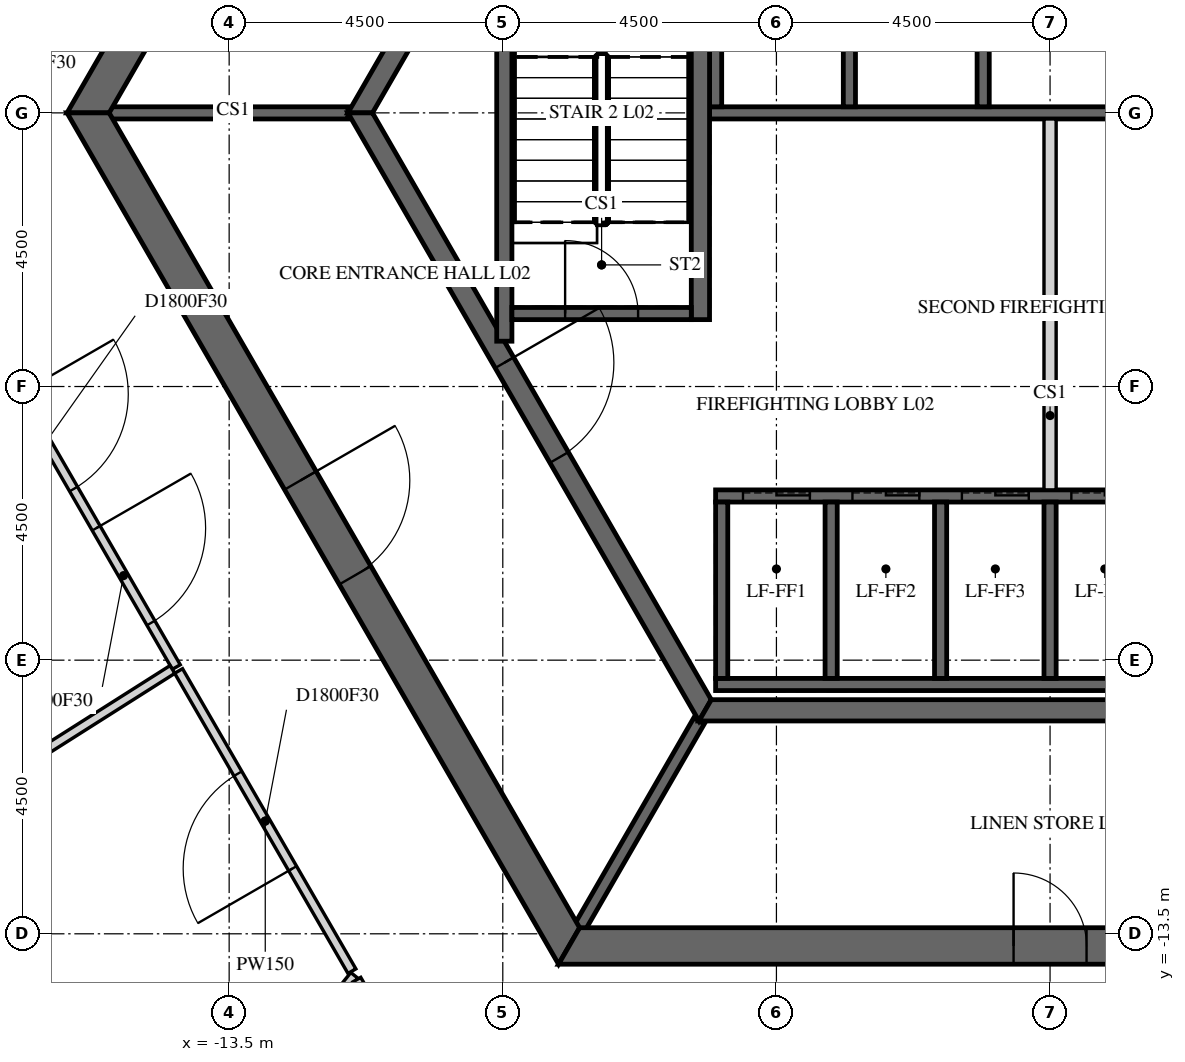
"""IFC4 building model, lengths in metres.
Left out: names, types, materials, properties, quantities, classifications, styles, units other than length and angle.
Written with IfcOpenShell. Run it as: python <this file> out.ifc"""

import sys

from ifc_helpers import new_model, si_unit, direction, frame, frame_2d, origin, place, context, subcontext, project, spatial, polyline, rectangle, outline, extrude, element, fill, save


model = new_model("IFC4")
c1 = context("Model", 3, precision=1e-05, world=origin(), true_north=direction((0.0, 1.0)))
c2 = subcontext(c1, "Body", "Model", "MODEL_VIEW")
j1 = project(units=[si_unit("LENGTHUNIT", "METRE"), si_unit("PLANEANGLEUNIT", "RADIAN")], contexts=[c1])
p1 = place(None, origin())
s1 = spatial("IfcSite", under=j1, at=p1, CompositionType="ELEMENT")
p2 = place(p1, origin())
s2 = spatial("IfcBuilding", under=s1, at=p2, CompositionType="ELEMENT")
p3 = place(p2, frame((0.0, 0.0, 15.0)))
s3 = spatial("IfcBuildingStorey", under=s2, at=p3, CompositionType="ELEMENT", Elevation=15.0)
p4 = place(p3, frame((-7.91, 13.7, -0.25), z_axis=(0.0, 0.0, 1.0), x_axis=(-0.499999880136, -0.866025472988, 0.0)))
e1 = element("IfcWall", 1, at=p4, inside=s3, PredefinedType="SHEAR", context=c2, shape_type="SweptSolid", body=[
    extrude(outline(polyline([(-0.173, -0.3), (15.993, -0.3), (15.646, 0.3), (0.173, 0.3), (-0.173, -0.3)])), origin(), (0.0, 0.0, 1.0), 5.5),
])
p5 = place(p4, frame((7.039, 0.0, 0.25)))
e2 = element("IfcOpeningElement", 2, at=p5, cuts=e1, PredefinedType="OPENING", context=c2, shape_type="SweptSolid", body=[
    extrude(rectangle(XDim=1.8, YDim=2.4, at=frame_2d((0.9, 1.2))), frame((0.0, 0.31, 0.0), z_axis=(0.0, -1.0, 0.0), x_axis=(1.0, 0.0, 0.0)), (0.0, 0.0, 1.0), 0.62),
])
p6 = place(p3, frame((-15.819, 0.0, -0.25), z_axis=(0.0, 0.0, 1.0), x_axis=(0.499999880136, -0.866025472988, 0.0)))
e3 = element("IfcWall", 3, at=p6, inside=s3, PredefinedType="SHEAR", context=c2, shape_type="SweptSolid", body=[
    extrude(outline(polyline([(-0.173, -0.3), (15.993, -0.3), (15.646, 0.3), (0.173, 0.3), (-0.173, -0.3)])), origin(), (0.0, 0.0, 1.0), 5.5),
])
p7 = place(p6, frame((6.981, 0.0, 0.25)))
e4 = element("IfcOpeningElement", 4, at=p7, cuts=e3, PredefinedType="OPENING", context=c2, shape_type="SweptSolid", body=[
    extrude(rectangle(XDim=1.8, YDim=2.4, at=frame_2d((0.9, 1.2))), frame((0.0, 0.31, 0.0), z_axis=(0.0, -1.0, 0.0), x_axis=(1.0, 0.0, 0.0)), (0.0, 0.0, 1.0), 0.62),
])
p8 = place(p3, frame((-7.91, -13.7, -0.25), z_axis=(0.0, 0.0, 1.0), x_axis=(1.0, 0.0, 0.0)))
e5 = element("IfcWall", 5, at=p8, inside=s3, PredefinedType="SHEAR", context=c2, shape_type="SweptSolid", body=[
    extrude(outline(polyline([(-0.173, -0.3), (15.993, -0.3), (15.646, 0.3), (0.173, 0.3), (-0.173, -0.3)])), origin(), (0.0, 0.0, 1.0), 5.5),
])
p9 = place(p8, frame((7.31, 0.0, 0.25)))
e6 = element("IfcOpeningElement", 6, at=p9, cuts=e5, PredefinedType="OPENING", context=c2, shape_type="SweptSolid", body=[
    extrude(rectangle(XDim=1.2, YDim=2.4, at=frame_2d((0.6, 1.2))), frame((0.0, 0.31, 0.0), z_axis=(0.0, -1.0, 0.0), x_axis=(1.0, 0.0, 0.0)), (0.0, 0.0, 1.0), 0.62),
])
p10 = place(p3, frame((-5.673, 9.825, -0.25), z_axis=(0.0, 0.0, 1.0), x_axis=(-0.499995046907, -0.866028263435, 0.0)))
e7 = element("IfcWall", 7, at=p10, inside=s3, PredefinedType="SHEAR", context=c2, shape_type="SweptSolid", body=[
    extrude(outline(polyline([(-0.101, -0.175), (11.446, -0.175), (11.244, 0.175), (0.101, 0.175), (-0.101, -0.175)])), origin(), (0.0, 0.0, 1.0), 5.5),
])
p11 = place(p10, frame((4.801, 0.0, 0.25)))
e8 = element("IfcOpeningElement", 8, at=p11, cuts=e7, PredefinedType="OPENING", context=c2, shape_type="SweptSolid", body=[
    extrude(rectangle(XDim=1.8, YDim=2.4, at=frame_2d((0.9, 1.2))), frame((0.0, 0.185, 0.0), z_axis=(0.0, -1.0, 0.0), x_axis=(1.0, 0.0, 0.0)), (0.0, 0.0, 1.0), 0.37),
])
p12 = place(p3, frame((-11.345, 0.0, -0.25), z_axis=(0.0, 0.0, 1.0), x_axis=(0.499995046907, -0.866028263435, 0.0)))
e9 = element("IfcWall", 9, at=p12, inside=s3, PredefinedType="SHEAR", context=c2, shape_type="SweptSolid", body=[
    extrude(outline(polyline([(-0.101, -0.175), (11.446, -0.175), (11.244, 0.175), (0.101, 0.175), (-0.101, -0.175)])), origin(), (0.0, 0.0, 1.0), 5.5),
])
p13 = place(p12, frame((4.744, 0.0, 0.25)))
e10 = element("IfcOpeningElement", 10, at=p13, cuts=e9, PredefinedType="OPENING", context=c2, shape_type="SweptSolid", body=[
    extrude(rectangle(XDim=1.8, YDim=2.4, at=frame_2d((0.9, 1.2))), frame((0.0, 0.185, 0.0), z_axis=(0.0, -1.0, 0.0), x_axis=(1.0, 0.0, 0.0)), (0.0, 0.0, 1.0), 0.37),
])
p14 = place(p3, frame((-5.673, -9.825, -0.25), z_axis=(0.0, 0.0, 1.0), x_axis=(1.0, 0.0, 0.0)))
e11 = element("IfcWall", 11, at=p14, inside=s3, PredefinedType="SHEAR", context=c2, shape_type="SweptSolid", body=[
    extrude(outline(polyline([(-0.101, -0.175), (11.446, -0.175), (11.244, 0.175), (0.101, 0.175), (-0.101, -0.175)])), origin(), (0.0, 0.0, 1.0), 5.5),
])
p15 = place(p3, frame((-5.6, 0.0, -0.25), z_axis=(0.0, 0.0, 1.0), x_axis=(1.0, 0.0, 0.0)))
e12 = element("IfcWall", 12, at=p15, inside=s3, PredefinedType="SHEAR", context=c2, shape_type="SweptSolid", body=[
    extrude(rectangle(XDim=11.2, YDim=0.2, at=frame_2d((5.6, 0.0))), origin(), (0.0, 0.0, 1.0), 5.5),
])
for number, where, z_axis, x_axis in (
    (13, (-5.5, 0.1, -0.25), (0.0, 0.0, 1.0), (0.0, 1.0, 0.0)),
    (14, (-3.3, 0.1, -0.25), (0.0, 0.0, 1.0), (0.0, 1.0, 0.0)),
    (15, (-1.1, 0.1, -0.25), (0.0, 0.0, 1.0), (0.0, 1.0, 0.0)),
):
    element("IfcWall", number, at=place(p3, frame(where, z_axis=z_axis, x_axis=x_axis)), inside=s3, PredefinedType="SHEAR", context=c2, shape_type="SweptSolid", body=[
        extrude(rectangle(XDim=3.1, YDim=0.2, at=frame_2d((1.55, 0.0))), origin(), (0.0, 0.0, 1.0), 5.5),
    ])
p16 = place(p3, frame((-5.5, -6.3, -0.25), z_axis=(0.0, 0.0, 1.0), x_axis=(1.0, 0.0, 0.0)))
e16 = element("IfcWall", 16, at=p16, inside=s3, PredefinedType="SHEAR", context=c2, shape_type="SweptSolid", body=[
    extrude(rectangle(XDim=9.2, YDim=0.2, at=frame_2d((4.6, 0.0))), origin(), (0.0, 0.0, 1.0), 5.5),
])
p17 = place(p16, frame((0.45, 0.0, 0.25)))
e17 = element("IfcOpeningElement", 17, at=p17, cuts=e16, PredefinedType="OPENING", context=c2, shape_type="SweptSolid", body=[
    extrude(rectangle(XDim=1.1, YDim=2.1, at=frame_2d((0.55, 1.05))), frame((0.0, 0.11, 0.0), z_axis=(0.0, -1.0, 0.0), x_axis=(1.0, 0.0, 0.0)), (0.0, 0.0, 1.0), 0.22),
])
p18 = place(p16, frame((2.25, 0.0, 0.25)))
e18 = element("IfcOpeningElement", 18, at=p18, cuts=e16, PredefinedType="OPENING", context=c2, shape_type="SweptSolid", body=[
    extrude(rectangle(XDim=1.1, YDim=2.1, at=frame_2d((0.55, 1.05))), frame((0.0, 0.11, 0.0), z_axis=(0.0, -1.0, 0.0), x_axis=(1.0, 0.0, 0.0)), (0.0, 0.0, 1.0), 0.22),
])
p19 = place(p16, frame((4.05, 0.0, 0.25)))
e19 = element("IfcOpeningElement", 19, at=p19, cuts=e16, PredefinedType="OPENING", context=c2, shape_type="SweptSolid", body=[
    extrude(rectangle(XDim=1.1, YDim=2.1, at=frame_2d((0.55, 1.05))), frame((0.0, 0.11, 0.0), z_axis=(0.0, -1.0, 0.0), x_axis=(1.0, 0.0, 0.0)), (0.0, 0.0, 1.0), 0.22),
])
p20 = place(p16, frame((5.85, 0.0, 0.25)))
e20 = element("IfcOpeningElement", 20, at=p20, cuts=e16, PredefinedType="OPENING", context=c2, shape_type="SweptSolid", body=[
    extrude(rectangle(XDim=1.1, YDim=2.1, at=frame_2d((0.55, 1.05))), frame((0.0, 0.11, 0.0), z_axis=(0.0, -1.0, 0.0), x_axis=(1.0, 0.0, 0.0)), (0.0, 0.0, 1.0), 0.22),
])
p21 = place(p16, frame((7.65, 0.0, 0.25)))
e21 = element("IfcOpeningElement", 21, at=p21, cuts=e16, PredefinedType="OPENING", context=c2, shape_type="SweptSolid", body=[
    extrude(rectangle(XDim=1.1, YDim=2.1, at=frame_2d((0.55, 1.05))), frame((0.0, 0.11, 0.0), z_axis=(0.0, -1.0, 0.0), x_axis=(1.0, 0.0, 0.0)), (0.0, 0.0, 1.0), 0.22),
])
p22 = place(p3, frame((-5.5, -9.4, -0.25), z_axis=(0.0, 0.0, 1.0), x_axis=(1.0, 0.0, 0.0)))
e22 = element("IfcWall", 22, at=p22, inside=s3, PredefinedType="SHEAR", context=c2, shape_type="SweptSolid", body=[
    extrude(rectangle(XDim=9.2, YDim=0.2, at=frame_2d((4.6, 0.0))), origin(), (0.0, 0.0, 1.0), 5.5),
])
for number, where, z_axis, x_axis in (
    (23, (-5.4, -9.3, -0.25), (0.0, 0.0, 1.0), (0.0, 1.0, 0.0)),
    (24, (-3.6, -9.3, -0.25), (0.0, 0.0, 1.0), (0.0, 1.0, 0.0)),
    (25, (-1.8, -9.3, -0.25), (0.0, 0.0, 1.0), (0.0, 1.0, 0.0)),
    (26, (0.0, -9.3, -0.25), (0.0, 0.0, 1.0), (0.0, 1.0, 0.0)),
):
    element("IfcWall", number, at=place(p3, frame(where, z_axis=z_axis, x_axis=x_axis)), inside=s3, PredefinedType="SHEAR", context=c2, shape_type="SweptSolid", body=[
        extrude(rectangle(XDim=2.9, YDim=0.2, at=frame_2d((1.45, 0.0))), origin(), (0.0, 0.0, 1.0), 5.5),
    ])
p23 = place(p3, frame((0.0, -6.2, 0.0), z_axis=(0.0, 0.0, 1.0), x_axis=(0.0, 1.0, 0.0)))
e27 = element("IfcWall", 27, at=p23, inside=s3, PredefinedType="PARTITIONING", context=c2, shape_type="SweptSolid", body=[
    extrude(rectangle(XDim=6.1, YDim=0.2, at=frame_2d((3.05, 0.0))), origin(), (0.0, 0.0, 1.0), 5.25),
])
p24 = place(p3, frame((-11.547, 0.0, -0.25), z_axis=(0.0, 0.0, 1.0), x_axis=(-1.0, 0.0, 0.0)))
e28 = element("IfcWall", 28, at=p24, inside=s3, PredefinedType="SHEAR", context=c2, shape_type="SweptSolid", body=[
    extrude(rectangle(XDim=3.926, YDim=0.2, at=frame_2d((1.963, 0.0))), origin(), (0.0, 0.0, 1.0), 5.5),
])
p25 = place(p3, frame((-5.773, -10.0, -0.25), z_axis=(0.0, 0.0, 1.0), x_axis=(-0.500038251005, -0.86600331843, 0.0)))
e29 = element("IfcWall", 29, at=p25, inside=s3, PredefinedType="SHEAR", context=c2, shape_type="SweptSolid", body=[
    extrude(rectangle(XDim=3.926, YDim=0.2, at=frame_2d((1.963, 0.0))), origin(), (0.0, 0.0, 1.0), 5.5),
])
p26 = place(p3, frame((-5.75, -3.4, -0.25), z_axis=(0.0, 0.0, 1.0), x_axis=(0.0, 1.0, 0.0)))
e30 = element("IfcWall", 30, at=p26, inside=s3, PredefinedType="SHEAR", context=c2, shape_type="SweptSolid", body=[
    extrude(rectangle(XDim=6.8, YDim=0.3, at=frame_2d((3.4, 0.0))), origin(), (0.0, 0.0, 1.0), 5.5),
])
p27 = place(p3, frame((-8.975, -3.755, -0.25), z_axis=(0.0, 0.0, 1.0), x_axis=(0.0, 1.0, 0.0)))
e31 = element("IfcWall", 31, at=p27, inside=s3, PredefinedType="SHEAR", context=c2, shape_type="SweptSolid", body=[
    extrude(rectangle(XDim=7.51, YDim=0.25, at=frame_2d((3.755, 0.0))), origin(), (0.0, 0.0, 1.0), 5.5),
])
p28 = place(p3, frame((-8.85, -3.3, -0.25), z_axis=(0.0, 0.0, 1.0), x_axis=(1.0, 0.0, 0.0)))
e32 = element("IfcWall", 32, at=p28, inside=s3, PredefinedType="SHEAR", context=c2, shape_type="SweptSolid", body=[
    extrude(rectangle(XDim=2.95, YDim=0.2, at=frame_2d((1.475, 0.0))), origin(), (0.0, 0.0, 1.0), 5.5),
])
p29 = place(p28, frame((0.875, 0.0, 0.25)))
e33 = element("IfcOpeningElement", 33, at=p29, cuts=e32, PredefinedType="OPENING", context=c2, shape_type="SweptSolid", body=[
    extrude(rectangle(XDim=1.2, YDim=2.4, at=frame_2d((0.6, 1.2))), frame((0.0, 0.11, 0.0), z_axis=(0.0, -1.0, 0.0), x_axis=(1.0, 0.0, 0.0)), (0.0, 0.0, 1.0), 0.22),
])
p30 = place(p3, frame((-19.584, -24.28, 0.0), z_axis=(0.0, 0.0, 1.0), x_axis=(0.627807267634, 0.77836882948, 0.0)))
e34 = element("IfcWall", 34, at=p30, inside=s3, PredefinedType="PARTITIONING", context=c2, shape_type="SweptSolid", body=[
    extrude(rectangle(XDim=12.971, YDim=0.15, at=frame_2d((6.485, 0.0))), origin(), (0.0, 0.0, 1.0), 5.25),
])
p31 = place(p3, frame((-18.649, -1.7, 0.0), z_axis=(0.0, 0.0, 1.0), x_axis=(0.499985805234, -0.866033598981, 0.0)))
e35 = element("IfcWall", 35, at=p31, inside=s3, PredefinedType="PARTITIONING", context=c2, shape_type="SweptSolid", body=[
    extrude(rectangle(XDim=8.56, YDim=0.15, at=frame_2d((4.28, 0.0))), origin(), (0.0, 0.0, 1.0), 5.25),
])
p32 = place(p31, frame((0.836, 0.0, 0.0)))
e36 = element("IfcOpeningElement", 36, at=p32, cuts=e35, PredefinedType="OPENING", context=c2, shape_type="SweptSolid", body=[
    extrude(rectangle(XDim=1.8, YDim=2.1, at=frame_2d((0.9, 1.05))), frame((0.0, 0.085, 0.0), z_axis=(0.0, -1.0, 0.0), x_axis=(1.0, 0.0, 0.0)), (0.0, 0.0, 1.0), 0.17),
])
p33 = place(p31, frame((3.38, 0.0, 0.0)))
e37 = element("IfcOpeningElement", 37, at=p33, cuts=e35, PredefinedType="OPENING", context=c2, shape_type="SweptSolid", body=[
    extrude(rectangle(XDim=1.8, YDim=2.1, at=frame_2d((0.9, 1.05))), frame((0.0, 0.085, 0.0), z_axis=(0.0, -1.0, 0.0), x_axis=(1.0, 0.0, 0.0)), (0.0, 0.0, 1.0), 0.17),
])
p34 = place(p31, frame((5.924, 0.0, 0.0)))
e38 = element("IfcOpeningElement", 38, at=p34, cuts=e35, PredefinedType="OPENING", context=c2, shape_type="SweptSolid", body=[
    extrude(rectangle(XDim=1.8, YDim=2.1, at=frame_2d((0.9, 1.05))), frame((0.0, 0.085, 0.0), z_axis=(0.0, -1.0, 0.0), x_axis=(1.0, 0.0, 0.0)), (0.0, 0.0, 1.0), 0.17),
])
p35 = place(p3, frame((-17.758, -11.262, 0.0), z_axis=(0.0, 0.0, 1.0), x_axis=(0.844546191186, 0.53548270836, 0.0)))
e39 = element("IfcWall", 39, at=p35, inside=s3, PredefinedType="PARTITIONING", context=c2, shape_type="SweptSolid", body=[
    extrude(rectangle(XDim=3.938, YDim=0.15, at=frame_2d((1.969, 0.0))), origin(), (0.0, 0.0, 1.0), 4.496),
])
p36 = place(p3, frame((-11.481, -14.114, 0.0), z_axis=(0.0, 0.0, 1.0), x_axis=(-0.500049947645, 0.865996564577, 0.0)))
e40 = element("IfcWall", 40, at=p36, inside=s3, PredefinedType="PARTITIONING", context=c2, shape_type="SweptSolid", body=[
    extrude(rectangle(XDim=5.7, YDim=0.15, at=frame_2d((2.85, 0.0))), origin(), (0.0, 0.0, 1.0), 5.25),
])
p37 = place(p36, frame((1.95, 0.0, 0.0)))
e41 = element("IfcOpeningElement", 41, at=p37, cuts=e40, PredefinedType="OPENING", context=c2, shape_type="SweptSolid", body=[
    extrude(rectangle(XDim=1.8, YDim=2.1, at=frame_2d((0.9, 1.05))), frame((0.0, 0.085, 0.0), z_axis=(0.0, -1.0, 0.0), x_axis=(1.0, 0.0, 0.0)), (0.0, 0.0, 1.0), 0.17),
])
p38 = place(p3, frame((-9.815, -17.0, 0.0), z_axis=(0.0, 0.0, 1.0), x_axis=(-0.500080068905, 0.865979171045, 0.0)))
e42 = element("IfcWall", 42, at=p38, inside=s3, PredefinedType="PARTITIONING", context=c2, shape_type="SweptSolid", body=[
    extrude(rectangle(XDim=3.171, YDim=0.15, at=frame_2d((1.586, 0.0))), origin(), (0.0, 0.0, 1.0), 5.25),
])
p39 = place(p38, frame((1.086, 0.0, 0.0)))
e43 = element("IfcOpeningElement", 43, at=p39, cuts=e42, PredefinedType="OPENING", context=c2, shape_type="SweptSolid", body=[
    extrude(rectangle(XDim=1.0, YDim=2.1, at=frame_2d((0.5, 1.05))), frame((0.0, 0.085, 0.0), z_axis=(0.0, -1.0, 0.0), x_axis=(1.0, 0.0, 0.0)), (0.0, 0.0, 1.0), 0.17),
])
p40 = place(p7, origin())
e44 = element("IfcDoor", 44, at=p40, inside=s3, OperationType="DOUBLE_DOOR_SINGLE_SWING", PredefinedType="DOOR", context=c2, shape_type="SweptSolid", body=[
    extrude(rectangle(XDim=1.8, YDim=2.4, at=frame_2d((0.9, 1.2))), frame((0.0, 0.025, 0.0), z_axis=(0.0, -1.0, 0.0), x_axis=(1.0, 0.0, 0.0)), (0.0, 0.0, 1.0), 0.05),
])
fill(e4, e44)
p41 = place(p9, origin())
e45 = element("IfcDoor", 45, at=p41, inside=s3, OperationType="SINGLE_SWING_LEFT", PredefinedType="DOOR", context=c2, shape_type="SweptSolid", body=[
    extrude(rectangle(XDim=1.2, YDim=2.4, at=frame_2d((0.6, 1.2))), frame((0.0, 0.025, 0.0), z_axis=(0.0, -1.0, 0.0), x_axis=(1.0, 0.0, 0.0)), (0.0, 0.0, 1.0), 0.05),
])
fill(e6, e45)
p42 = place(p13, origin())
e46 = element("IfcDoor", 46, at=p42, inside=s3, OperationType="DOUBLE_DOOR_SINGLE_SWING", PredefinedType="DOOR", context=c2, shape_type="SweptSolid", body=[
    extrude(rectangle(XDim=1.8, YDim=2.4, at=frame_2d((0.9, 1.2))), frame((0.0, 0.025, 0.0), z_axis=(0.0, -1.0, 0.0), x_axis=(1.0, 0.0, 0.0)), (0.0, 0.0, 1.0), 0.05),
])
fill(e10, e46)
p43 = place(p29, origin())
e47 = element("IfcDoor", 47, at=p43, inside=s3, OperationType="SINGLE_SWING_LEFT", PredefinedType="DOOR", context=c2, shape_type="SweptSolid", body=[
    extrude(rectangle(XDim=1.2, YDim=2.4, at=frame_2d((0.6, 1.2))), frame((0.0, 0.025, 0.0), z_axis=(0.0, -1.0, 0.0), x_axis=(1.0, 0.0, 0.0)), (0.0, 0.0, 1.0), 0.05),
])
fill(e33, e47)
p44 = place(p17, origin())
e48 = element("IfcDoor", 48, at=p44, inside=s3, OperationType="SLIDING_TO_LEFT", PredefinedType="DOOR", context=c2, shape_type="SweptSolid", body=[
    extrude(rectangle(XDim=1.1, YDim=2.1, at=frame_2d((0.55, 1.05))), frame((0.0, 0.025, 0.0), z_axis=(0.0, -1.0, 0.0), x_axis=(1.0, 0.0, 0.0)), (0.0, 0.0, 1.0), 0.05),
])
fill(e17, e48)
p45 = place(p18, origin())
e49 = element("IfcDoor", 49, at=p45, inside=s3, OperationType="SLIDING_TO_LEFT", PredefinedType="DOOR", context=c2, shape_type="SweptSolid", body=[
    extrude(rectangle(XDim=1.1, YDim=2.1, at=frame_2d((0.55, 1.05))), frame((0.0, 0.025, 0.0), z_axis=(0.0, -1.0, 0.0), x_axis=(1.0, 0.0, 0.0)), (0.0, 0.0, 1.0), 0.05),
])
fill(e18, e49)
p46 = place(p19, origin())
e50 = element("IfcDoor", 50, at=p46, inside=s3, OperationType="SLIDING_TO_LEFT", PredefinedType="DOOR", context=c2, shape_type="SweptSolid", body=[
    extrude(rectangle(XDim=1.1, YDim=2.1, at=frame_2d((0.55, 1.05))), frame((0.0, 0.025, 0.0), z_axis=(0.0, -1.0, 0.0), x_axis=(1.0, 0.0, 0.0)), (0.0, 0.0, 1.0), 0.05),
])
fill(e19, e50)
p47 = place(p20, origin())
e51 = element("IfcDoor", 51, at=p47, inside=s3, OperationType="SLIDING_TO_LEFT", PredefinedType="DOOR", context=c2, shape_type="SweptSolid", body=[
    extrude(rectangle(XDim=1.1, YDim=2.1, at=frame_2d((0.55, 1.05))), frame((0.0, 0.025, 0.0), z_axis=(0.0, -1.0, 0.0), x_axis=(1.0, 0.0, 0.0)), (0.0, 0.0, 1.0), 0.05),
])
fill(e20, e51)
p48 = place(p33, origin())
e52 = element("IfcDoor", 52, at=p48, inside=s3, OperationType="DOUBLE_DOOR_SINGLE_SWING", PredefinedType="DOOR", context=c2, shape_type="SweptSolid", body=[
    extrude(rectangle(XDim=1.8, YDim=2.1, at=frame_2d((0.9, 1.05))), frame((0.0, 0.025, 0.0), z_axis=(0.0, -1.0, 0.0), x_axis=(1.0, 0.0, 0.0)), (0.0, 0.0, 1.0), 0.05),
])
fill(e37, e52)
p49 = place(p34, origin())
e53 = element("IfcDoor", 53, at=p49, inside=s3, OperationType="DOUBLE_DOOR_SINGLE_SWING", PredefinedType="DOOR", context=c2, shape_type="SweptSolid", body=[
    extrude(rectangle(XDim=1.8, YDim=2.1, at=frame_2d((0.9, 1.05))), frame((0.0, 0.025, 0.0), z_axis=(0.0, -1.0, 0.0), x_axis=(1.0, 0.0, 0.0)), (0.0, 0.0, 1.0), 0.05),
])
fill(e38, e53)
p50 = place(p37, origin())
e54 = element("IfcDoor", 54, at=p50, inside=s3, OperationType="DOUBLE_DOOR_SINGLE_SWING", PredefinedType="DOOR", context=c2, shape_type="SweptSolid", body=[
    extrude(rectangle(XDim=1.8, YDim=2.1, at=frame_2d((0.9, 1.05))), frame((0.0, 0.025, 0.0), z_axis=(0.0, -1.0, 0.0), x_axis=(1.0, 0.0, 0.0)), (0.0, 0.0, 1.0), 0.05),
])
fill(e41, e54)
save(model, sys.argv[1])
